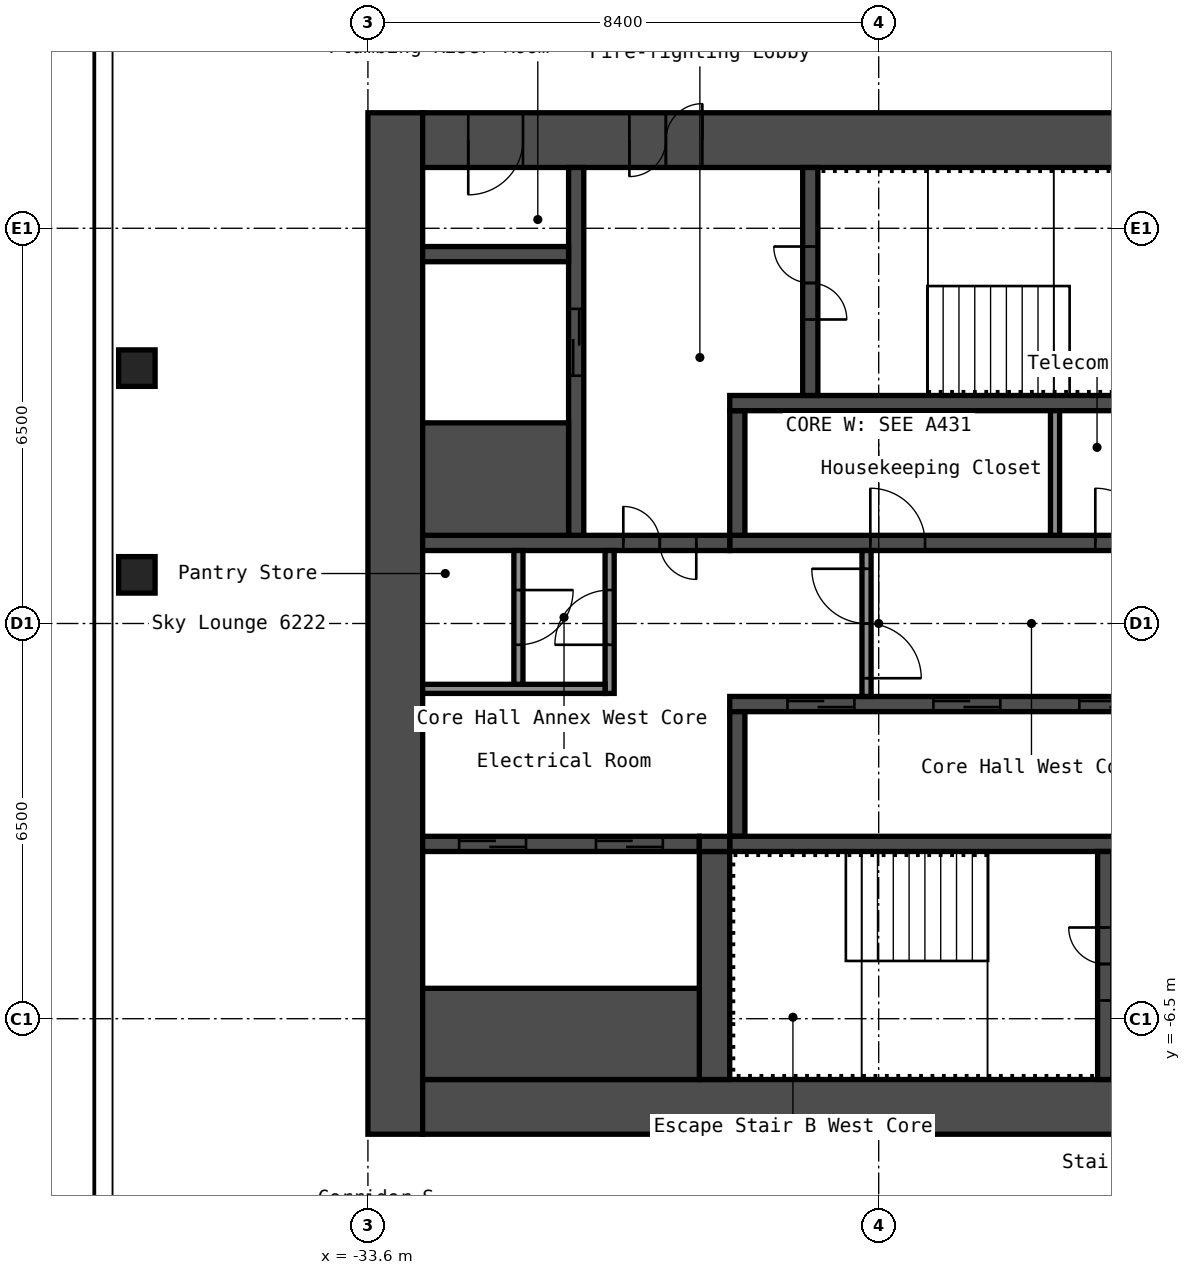
"""IFC4 building model, lengths in metres.
Left out: names, types, materials, properties, quantities, classifications, styles, units other than length and angle.
Written with IfcOpenShell. Run it as: python <this file> out.ifc"""

import sys

from ifc_helpers import new_model, si_unit, direction, frame, frame_2d, origin, origin_2d, place, context, subcontext, project, spatial, rectangle, hollow_rectangle, extrude, element, fill, save


model = new_model("IFC4")
c1 = context("Model", 3, precision=1e-05, world=origin(), true_north=direction((0.0, 1.0)))
c2 = subcontext(c1, "Body", "Model", "MODEL_VIEW")
j1 = project(units=[si_unit("LENGTHUNIT", "METRE"), si_unit("PLANEANGLEUNIT", "RADIAN")], contexts=[c1])
p1 = place(None, origin())
s1 = spatial("IfcSite", under=j1, at=p1, CompositionType="ELEMENT")
p2 = place(p1, origin())
s2 = spatial("IfcBuilding", under=s1, at=p2, CompositionType="ELEMENT")
p3 = place(p2, frame((0.0, 0.0, 218.6)))
s3 = spatial("IfcBuildingStorey", under=s2, at=p3, CompositionType="ELEMENT", Elevation=218.6)
for number, where, z_axis, x_axis in (
    (1, (-37.4, 0.8, 0.0), (0.0, 0.0, 1.0), (1.0, 0.0, 0.0)),
    (2, (-37.4, 4.2, 0.0), (0.0, 0.0, 1.0), (1.0, 0.0, 0.0)),
):
    element("IfcColumn", number, at=place(p3, frame(where, z_axis=z_axis, x_axis=x_axis)), inside=s3, PredefinedType="COLUMN", context=c2, shape_type="SweptSolid", body=[
        extrude(hollow_rectangle(XDim=0.6, YDim=0.6, WallThickness=0.025, InnerFilletRadius=0.038, OuterFilletRadius=0.062, at=origin_2d()), origin(), (0.0, 0.0, 1.0), 2.75),
    ])
p4 = place(p3, frame((-33.15, -8.4, 0.0), z_axis=(0.0, 0.0, 1.0), x_axis=(0.0, 1.0, 0.0)))
e3 = element("IfcWall", 3, at=p4, inside=s3, PredefinedType="SHEAR", context=c2, shape_type="SweptSolid", body=[
    extrude(rectangle(XDim=16.8, YDim=0.9, at=frame_2d((8.4, 0.0))), origin(), (0.0, 0.0, 1.0), 2.75),
])
p5 = place(p3, frame((-32.7, 7.95, 0.0), z_axis=(0.0, 0.0, 1.0), x_axis=(1.0, 0.0, 0.0)))
e4 = element("IfcWall", 4, at=p5, inside=s3, PredefinedType="SHEAR", context=c2, shape_type="SweptSolid", body=[
    extrude(rectangle(XDim=15.0, YDim=0.9, at=frame_2d((7.5, 0.0))), origin(), (0.0, 0.0, 1.0), 2.75),
])
p6 = place(p5, frame((3.4, 0.0, 0.0)))
e5 = element("IfcOpeningElement", 5, at=p6, cuts=e4, PredefinedType="OPENING", context=c2, shape_type="SweptSolid", body=[
    extrude(rectangle(XDim=1.2, YDim=2.1, at=frame_2d((0.6, 1.05))), frame((0.0, 0.46, 0.0), z_axis=(0.0, -1.0, 0.0), x_axis=(1.0, 0.0, 0.0)), (0.0, 0.0, 1.0), 0.92),
])
p7 = place(p5, frame((0.75, 0.0, 0.0)))
e6 = element("IfcOpeningElement", 6, at=p7, cuts=e4, PredefinedType="OPENING", context=c2, shape_type="SweptSolid", body=[
    extrude(rectangle(XDim=0.9, YDim=2.1, at=frame_2d((0.45, 1.05))), frame((0.0, 0.46, 0.0), z_axis=(0.0, -1.0, 0.0), x_axis=(1.0, 0.0, 0.0)), (0.0, 0.0, 1.0), 0.92),
])
p8 = place(p3, frame((-32.7, -7.95, 0.0), z_axis=(0.0, 0.0, 1.0), x_axis=(1.0, 0.0, 0.0)))
e7 = element("IfcWall", 7, at=p8, inside=s3, PredefinedType="SHEAR", context=c2, shape_type="SweptSolid", body=[
    extrude(rectangle(XDim=15.0, YDim=0.9, at=frame_2d((7.5, 0.0))), origin(), (0.0, 0.0, 1.0), 2.75),
])
p9 = place(p8, frame((11.45, 0.0, 0.0)))
e8 = element("IfcOpeningElement", 8, at=p9, cuts=e7, PredefinedType="OPENING", context=c2, shape_type="SweptSolid", body=[
    extrude(rectangle(XDim=1.0, YDim=2.1, at=frame_2d((0.5, 1.05))), frame((0.0, 0.46, 0.0), z_axis=(0.0, -1.0, 0.0), x_axis=(1.0, 0.0, 0.0)), (0.0, 0.0, 1.0), 0.92),
])
p10 = place(p3, frame((-27.65, 1.325, 0.0), z_axis=(0.0, 0.0, 1.0), x_axis=(1.0, 0.0, 0.0)))
e9 = element("IfcWall", 9, at=p10, inside=s3, PredefinedType="SHEAR", context=c2, shape_type="SweptSolid", body=[
    extrude(rectangle(XDim=7.5, YDim=0.25, at=frame_2d((3.75, 0.0))), origin(), (0.0, 0.0, 1.0), 2.75),
])
p11 = place(p10, frame((6.012, 0.0, 0.0)))
e10 = element("IfcOpeningElement", 10, at=p11, cuts=e9, PredefinedType="OPENING", context=c2, shape_type="SweptSolid", body=[
    extrude(rectangle(XDim=0.9, YDim=2.1, at=frame_2d((0.45, 1.05))), frame((0.0, 0.135, 0.0), z_axis=(0.0, -1.0, 0.0), x_axis=(1.0, 0.0, 0.0)), (0.0, 0.0, 1.0), 0.27),
])
p12 = place(p10, frame((2.312, 0.0, 0.0)))
e11 = element("IfcOpeningElement", 11, at=p12, cuts=e9, PredefinedType="OPENING", context=c2, shape_type="SweptSolid", body=[
    extrude(rectangle(XDim=0.9, YDim=2.1, at=frame_2d((0.45, 1.05))), frame((0.0, 0.135, 0.0), z_axis=(0.0, -1.0, 0.0), x_axis=(1.0, 0.0, 0.0)), (0.0, 0.0, 1.0), 0.27),
])
p13 = place(p3, frame((-27.525, 1.45, 0.0), z_axis=(0.0, 0.0, 1.0), x_axis=(0.0, 1.0, 0.0)))
e12 = element("IfcWall", 12, at=p13, inside=s3, PredefinedType="SHEAR", context=c2, shape_type="SweptSolid", body=[
    extrude(rectangle(XDim=2.05, YDim=0.25, at=frame_2d((1.025, 0.0))), origin(), (0.0, 0.0, 1.0), 2.75),
])
p14 = place(p3, frame((-27.65, 3.625, 0.0), z_axis=(0.0, 0.0, 1.0), x_axis=(1.0, 0.0, 0.0)))
e13 = element("IfcWall", 13, at=p14, inside=s3, PredefinedType="SHEAR", context=c2, shape_type="SweptSolid", body=[
    extrude(rectangle(XDim=7.5, YDim=0.25, at=frame_2d((3.75, 0.0))), origin(), (0.0, 0.0, 1.0), 2.75),
])
p15 = place(p3, frame((-26.325, 3.75, 0.0), z_axis=(0.0, 0.0, 1.0), x_axis=(0.0, 1.0, 0.0)))
e14 = element("IfcWall", 14, at=p15, inside=s3, PredefinedType="SHEAR", context=c2, shape_type="SweptSolid", body=[
    extrude(rectangle(XDim=3.75, YDim=0.25, at=frame_2d((1.875, 0.0))), origin(), (0.0, 0.0, 1.0), 2.75),
])
p16 = place(p15, frame((1.25, 0.0, 0.0)))
e15 = element("IfcOpeningElement", 15, at=p16, cuts=e14, PredefinedType="OPENING", context=c2, shape_type="SweptSolid", body=[
    extrude(rectangle(XDim=1.2, YDim=2.1, at=frame_2d((0.6, 1.05))), frame((0.0, 0.135, 0.0), z_axis=(0.0, -1.0, 0.0), x_axis=(1.0, 0.0, 0.0)), (0.0, 0.0, 1.0), 0.27),
])
p17 = place(p3, frame((-32.7, 1.325, 0.0), z_axis=(0.0, 0.0, 1.0), x_axis=(1.0, 0.0, 0.0)))
e16 = element("IfcWall", 16, at=p17, inside=s3, PredefinedType="SHEAR", context=c2, shape_type="SweptSolid", body=[
    extrude(rectangle(XDim=5.05, YDim=0.25, at=frame_2d((2.525, 0.0))), origin(), (0.0, 0.0, 1.0), 2.75),
])
p18 = place(p17, frame((3.3, 0.0, 0.0)))
e17 = element("IfcOpeningElement", 17, at=p18, cuts=e16, PredefinedType="OPENING", context=c2, shape_type="SweptSolid", body=[
    extrude(rectangle(XDim=1.2, YDim=2.1, at=frame_2d((0.6, 1.05))), frame((0.0, 0.135, 0.0), z_axis=(0.0, -1.0, 0.0), x_axis=(1.0, 0.0, 0.0)), (0.0, 0.0, 1.0), 0.27),
])
p19 = place(p3, frame((-30.175, 1.45, 0.0), z_axis=(0.0, 0.0, 1.0), x_axis=(0.0, 1.0, 0.0)))
e18 = element("IfcWall", 18, at=p19, inside=s3, PredefinedType="SHEAR", context=c2, shape_type="SweptSolid", body=[
    extrude(rectangle(XDim=6.05, YDim=0.25, at=frame_2d((3.025, 0.0))), origin(), (0.0, 0.0, 1.0), 2.75),
])
p20 = place(p19, frame((2.625, 0.0, 0.0)))
e19 = element("IfcOpeningElement", 19, at=p20, cuts=e18, PredefinedType="OPENING", context=c2, shape_type="SweptSolid", body=[
    extrude(rectangle(XDim=1.1, YDim=2.1, at=frame_2d((0.55, 1.05))), frame((0.0, 0.135, 0.0), z_axis=(0.0, -1.0, 0.0), x_axis=(1.0, 0.0, 0.0)), (0.0, 0.0, 1.0), 0.27),
])
p21 = place(p3, frame((-32.7, 2.375, 0.0), z_axis=(0.0, 0.0, 1.0), x_axis=(1.0, 0.0, 0.0)))
e20 = element("IfcWall", 20, at=p21, inside=s3, PredefinedType="SHEAR", context=c2, shape_type="SweptSolid", body=[
    extrude(rectangle(XDim=2.4, YDim=1.85, at=frame_2d((1.2, 0.0))), origin(), (0.0, 0.0, 1.0), 2.75),
])
p22 = place(p3, frame((-32.7, 6.075, 0.0), z_axis=(0.0, 0.0, 1.0), x_axis=(1.0, 0.0, 0.0)))
e21 = element("IfcWall", 21, at=p22, inside=s3, PredefinedType="SHEAR", context=c2, shape_type="SweptSolid", body=[
    extrude(rectangle(XDim=2.4, YDim=0.25, at=frame_2d((1.2, 0.0))), origin(), (0.0, 0.0, 1.0), 2.75),
])
p23 = place(p3, frame((-27.65, -1.325, 0.0), z_axis=(0.0, 0.0, 1.0), x_axis=(1.0, 0.0, 0.0)))
e22 = element("IfcWall", 22, at=p23, inside=s3, PredefinedType="SHEAR", context=c2, shape_type="SweptSolid", body=[
    extrude(rectangle(XDim=7.5, YDim=0.25, at=frame_2d((3.75, 0.0))), origin(), (0.0, 0.0, 1.0), 2.75),
])
p24 = place(p23, frame((5.75, 0.0, 0.0)))
e23 = element("IfcOpeningElement", 23, at=p24, cuts=e22, PredefinedType="OPENING", context=c2, shape_type="SweptSolid", body=[
    extrude(rectangle(XDim=1.1, YDim=2.1, at=frame_2d((0.55, 1.05))), frame((0.0, 0.135, 0.0), z_axis=(0.0, -1.0, 0.0), x_axis=(1.0, 0.0, 0.0)), (0.0, 0.0, 1.0), 0.27),
])
p25 = place(p23, frame((3.35, 0.0, 0.0)))
e24 = element("IfcOpeningElement", 24, at=p25, cuts=e22, PredefinedType="OPENING", context=c2, shape_type="SweptSolid", body=[
    extrude(rectangle(XDim=1.1, YDim=2.1, at=frame_2d((0.55, 1.05))), frame((0.0, 0.135, 0.0), z_axis=(0.0, -1.0, 0.0), x_axis=(1.0, 0.0, 0.0)), (0.0, 0.0, 1.0), 0.27),
])
p26 = place(p23, frame((0.95, 0.0, 0.0)))
e25 = element("IfcOpeningElement", 25, at=p26, cuts=e22, PredefinedType="OPENING", context=c2, shape_type="SweptSolid", body=[
    extrude(rectangle(XDim=1.1, YDim=2.1, at=frame_2d((0.55, 1.05))), frame((0.0, 0.135, 0.0), z_axis=(0.0, -1.0, 0.0), x_axis=(1.0, 0.0, 0.0)), (0.0, 0.0, 1.0), 0.27),
])
p27 = place(p3, frame((-27.525, -3.5, 0.0), z_axis=(0.0, 0.0, 1.0), x_axis=(0.0, 1.0, 0.0)))
e26 = element("IfcWall", 26, at=p27, inside=s3, PredefinedType="SHEAR", context=c2, shape_type="SweptSolid", body=[
    extrude(rectangle(XDim=2.05, YDim=0.25, at=frame_2d((1.025, 0.0))), origin(), (0.0, 0.0, 1.0), 2.75),
])
p28 = place(p3, frame((-27.65, -3.625, 0.0), z_axis=(0.0, 0.0, 1.0), x_axis=(1.0, 0.0, 0.0)))
e27 = element("IfcWall", 27, at=p28, inside=s3, PredefinedType="SHEAR", context=c2, shape_type="SweptSolid", body=[
    extrude(rectangle(XDim=7.5, YDim=0.25, at=frame_2d((3.75, 0.0))), origin(), (0.0, 0.0, 1.0), 2.75),
])
p29 = place(p3, frame((-21.475, -7.5, 0.0), z_axis=(0.0, 0.0, 1.0), x_axis=(0.0, 1.0, 0.0)))
e28 = element("IfcWall", 28, at=p29, inside=s3, PredefinedType="SHEAR", context=c2, shape_type="SweptSolid", body=[
    extrude(rectangle(XDim=3.75, YDim=0.25, at=frame_2d((1.875, 0.0))), origin(), (0.0, 0.0, 1.0), 2.75),
])
p30 = place(p29, frame((1.3, 0.0, 0.0)))
e29 = element("IfcOpeningElement", 29, at=p30, cuts=e28, PredefinedType="OPENING", context=c2, shape_type="SweptSolid", body=[
    extrude(rectangle(XDim=1.2, YDim=2.1, at=frame_2d((0.6, 1.05))), frame((0.0, 0.135, 0.0), z_axis=(0.0, -1.0, 0.0), x_axis=(1.0, 0.0, 0.0)), (0.0, 0.0, 1.0), 0.27),
])
p31 = place(p3, frame((-27.9, -7.5, 0.0), z_axis=(0.0, 0.0, 1.0), x_axis=(0.0, 1.0, 0.0)))
e30 = element("IfcWall", 30, at=p31, inside=s3, PredefinedType="SHEAR", context=c2, shape_type="SweptSolid", body=[
    extrude(rectangle(XDim=3.75, YDim=0.5, at=frame_2d((1.875, 0.0))), origin(), (0.0, 0.0, 1.0), 2.75),
])
p32 = place(p3, frame((-32.7, -3.625, 0.0), z_axis=(0.0, 0.0, 1.0), x_axis=(1.0, 0.0, 0.0)))
e31 = element("IfcWall", 31, at=p32, inside=s3, PredefinedType="SHEAR", context=c2, shape_type="SweptSolid", body=[
    extrude(rectangle(XDim=4.55, YDim=0.25, at=frame_2d((2.275, 0.0))), origin(), (0.0, 0.0, 1.0), 2.75),
])
p33 = place(p32, frame((2.85, 0.0, 0.0)))
e32 = element("IfcOpeningElement", 32, at=p33, cuts=e31, PredefinedType="OPENING", context=c2, shape_type="SweptSolid", body=[
    extrude(rectangle(XDim=1.1, YDim=2.1, at=frame_2d((0.55, 1.05))), frame((0.0, 0.135, 0.0), z_axis=(0.0, -1.0, 0.0), x_axis=(1.0, 0.0, 0.0)), (0.0, 0.0, 1.0), 0.27),
])
p34 = place(p32, frame((0.6, 0.0, 0.0)))
e33 = element("IfcOpeningElement", 33, at=p34, cuts=e31, PredefinedType="OPENING", context=c2, shape_type="SweptSolid", body=[
    extrude(rectangle(XDim=1.1, YDim=2.1, at=frame_2d((0.55, 1.05))), frame((0.0, 0.135, 0.0), z_axis=(0.0, -1.0, 0.0), x_axis=(1.0, 0.0, 0.0)), (0.0, 0.0, 1.0), 0.27),
])
p35 = place(p3, frame((-32.7, -6.75, 0.0), z_axis=(0.0, 0.0, 1.0), x_axis=(1.0, 0.0, 0.0)))
e34 = element("IfcWall", 34, at=p35, inside=s3, PredefinedType="SHEAR", context=c2, shape_type="SweptSolid", body=[
    extrude(rectangle(XDim=4.55, YDim=1.5, at=frame_2d((2.275, 0.0))), origin(), (0.0, 0.0, 1.0), 2.75),
])
p36 = place(p3, frame((-28.15, -3.625, 0.0), z_axis=(0.0, 0.0, 1.0), x_axis=(1.0, 0.0, 0.0)))
e35 = element("IfcWall", 35, at=p36, inside=s3, PredefinedType="SHEAR", context=c2, shape_type="SweptSolid", body=[
    extrude(rectangle(XDim=0.5, YDim=0.25, at=frame_2d((0.25, 0.0))), origin(), (0.0, 0.0, 1.0), 2.75),
])
p37 = place(p3, frame((-25.4, -1.2, 0.0), z_axis=(0.0, 0.0, 1.0), x_axis=(0.0, 1.0, 0.0)))
e36 = element("IfcWall", 36, at=p37, inside=s3, PredefinedType="PARTITIONING", context=c2, shape_type="SweptSolid", body=[
    extrude(rectangle(XDim=2.4, YDim=0.15, at=frame_2d((1.2, 0.0))), origin(), (0.0, 0.0, 1.0), 2.75),
])
p38 = place(p37, frame((0.3, 0.0, 0.0)))
e37 = element("IfcOpeningElement", 37, at=p38, cuts=e36, PredefinedType="OPENING", context=c2, shape_type="SweptSolid", body=[
    extrude(rectangle(XDim=1.8, YDim=2.1, at=frame_2d((0.9, 1.05))), frame((0.0, 0.085, 0.0), z_axis=(0.0, -1.0, 0.0), x_axis=(1.0, 0.0, 0.0)), (0.0, 0.0, 1.0), 0.17),
])
p39 = place(p3, frame((-29.625, -1.15, 0.0), z_axis=(0.0, 0.0, 1.0), x_axis=(0.0, 1.0, 0.0)))
e38 = element("IfcWall", 38, at=p39, inside=s3, PredefinedType="PARTITIONING", context=c2, shape_type="SweptSolid", body=[
    extrude(rectangle(XDim=2.35, YDim=0.15, at=frame_2d((1.175, 0.0))), origin(), (0.0, 0.0, 1.0), 2.75),
])
p40 = place(p39, frame((0.8, 0.0, 0.0)))
e39 = element("IfcOpeningElement", 39, at=p40, cuts=e38, PredefinedType="OPENING", context=c2, shape_type="SweptSolid", body=[
    extrude(rectangle(XDim=0.9, YDim=2.1, at=frame_2d((0.45, 1.05))), frame((0.0, 0.085, 0.0), z_axis=(0.0, -1.0, 0.0), x_axis=(1.0, 0.0, 0.0)), (0.0, 0.0, 1.0), 0.17),
])
p41 = place(p3, frame((-32.7, -1.075, 0.0), z_axis=(0.0, 0.0, 1.0), x_axis=(1.0, 0.0, 0.0)))
e40 = element("IfcWall", 40, at=p41, inside=s3, PredefinedType="PARTITIONING", context=c2, shape_type="SweptSolid", body=[
    extrude(rectangle(XDim=3.0, YDim=0.15, at=frame_2d((1.5, 0.0))), origin(), (0.0, 0.0, 1.0), 2.75),
])
p42 = place(p3, frame((-31.125, -1.0, 0.0), z_axis=(0.0, 0.0, 1.0), x_axis=(0.0, 1.0, 0.0)))
e41 = element("IfcWall", 41, at=p42, inside=s3, PredefinedType="PARTITIONING", context=c2, shape_type="SweptSolid", body=[
    extrude(rectangle(XDim=2.2, YDim=0.15, at=frame_2d((1.1, 0.0))), origin(), (0.0, 0.0, 1.0), 2.75),
])
p43 = place(p42, frame((0.65, 0.0, 0.0)))
e42 = element("IfcOpeningElement", 42, at=p43, cuts=e41, PredefinedType="OPENING", context=c2, shape_type="SweptSolid", body=[
    extrude(rectangle(XDim=0.9, YDim=2.1, at=frame_2d((0.45, 1.05))), frame((0.0, 0.085, 0.0), z_axis=(0.0, -1.0, 0.0), x_axis=(1.0, 0.0, 0.0)), (0.0, 0.0, 1.0), 0.17),
])
p44 = place(p3, frame((-22.3, 1.45, 0.0), z_axis=(0.0, 0.0, 1.0), x_axis=(0.0, 1.0, 0.0)))
e43 = element("IfcWall", 43, at=p44, inside=s3, PredefinedType="PARTITIONING", context=c2, shape_type="SweptSolid", body=[
    extrude(rectangle(XDim=2.05, YDim=0.15, at=frame_2d((1.025, 0.0))), origin(), (0.0, 0.0, 1.0), 2.75),
])
p45 = place(p6, origin())
e44 = element("IfcDoor", 44, at=p45, inside=s3, OperationType="DOUBLE_DOOR_SINGLE_SWING", PredefinedType="DOOR", context=c2, shape_type="SweptSolid", body=[
    extrude(rectangle(XDim=1.2, YDim=2.1, at=frame_2d((0.6, 1.05))), frame((0.0, 0.025, 0.0), z_axis=(0.0, -1.0, 0.0), x_axis=(1.0, 0.0, 0.0)), (0.0, 0.0, 1.0), 0.05),
])
fill(e5, e44)
p46 = place(p7, origin())
e45 = element("IfcDoor", 45, at=p46, inside=s3, OperationType="SINGLE_SWING_LEFT", PredefinedType="DOOR", context=c2, shape_type="SweptSolid", body=[
    extrude(rectangle(XDim=0.9, YDim=2.1, at=frame_2d((0.45, 1.05))), frame((0.0, 0.025, 0.0), z_axis=(0.0, -1.0, 0.0), x_axis=(1.0, 0.0, 0.0)), (0.0, 0.0, 1.0), 0.05),
])
fill(e6, e45)
p47 = place(p16, origin())
e46 = element("IfcDoor", 46, at=p47, inside=s3, OperationType="DOUBLE_DOOR_SINGLE_SWING", PredefinedType="DOOR", context=c2, shape_type="SweptSolid", body=[
    extrude(rectangle(XDim=1.2, YDim=2.1, at=frame_2d((0.6, 1.05))), frame((0.0, 0.025, 0.0), z_axis=(0.0, -1.0, 0.0), x_axis=(1.0, 0.0, 0.0)), (0.0, 0.0, 1.0), 0.05),
])
fill(e15, e46)
p48 = place(p30, origin())
e47 = element("IfcDoor", 47, at=p48, inside=s3, OperationType="DOUBLE_DOOR_SINGLE_SWING", PredefinedType="DOOR", context=c2, shape_type="SweptSolid", body=[
    extrude(rectangle(XDim=1.2, YDim=2.1, at=frame_2d((0.6, 1.05))), frame((0.0, 0.025, 0.0), z_axis=(0.0, -1.0, 0.0), x_axis=(1.0, 0.0, 0.0)), (0.0, 0.0, 1.0), 0.05),
])
fill(e29, e47)
p49 = place(p18, origin())
e48 = element("IfcDoor", 48, at=p49, inside=s3, OperationType="DOUBLE_DOOR_SINGLE_SWING", PredefinedType="DOOR", context=c2, shape_type="SweptSolid", body=[
    extrude(rectangle(XDim=1.2, YDim=2.1, at=frame_2d((0.6, 1.05))), frame((0.0, 0.025, 0.0), z_axis=(0.0, -1.0, 0.0), x_axis=(1.0, 0.0, 0.0)), (0.0, 0.0, 1.0), 0.05),
])
fill(e17, e48)
p50 = place(p38, origin())
e49 = element("IfcDoor", 49, at=p50, inside=s3, OperationType="DOUBLE_DOOR_SINGLE_SWING", PredefinedType="DOOR", context=c2, shape_type="SweptSolid", body=[
    extrude(rectangle(XDim=1.8, YDim=2.1, at=frame_2d((0.9, 1.05))), frame((0.0, 0.025, 0.0), z_axis=(0.0, -1.0, 0.0), x_axis=(1.0, 0.0, 0.0)), (0.0, 0.0, 1.0), 0.05),
])
fill(e37, e49)
p51 = place(p40, origin())
e50 = element("IfcDoor", 50, at=p51, inside=s3, OperationType="SINGLE_SWING_RIGHT", PredefinedType="DOOR", context=c2, shape_type="SweptSolid", body=[
    extrude(rectangle(XDim=0.9, YDim=2.1, at=frame_2d((0.45, 1.05))), frame((0.0, 0.025, 0.0), z_axis=(0.0, -1.0, 0.0), x_axis=(1.0, 0.0, 0.0)), (0.0, 0.0, 1.0), 0.05),
])
fill(e39, e50)
p52 = place(p43, origin())
e51 = element("IfcDoor", 51, at=p52, inside=s3, OperationType="SINGLE_SWING_RIGHT", PredefinedType="DOOR", context=c2, shape_type="SweptSolid", body=[
    extrude(rectangle(XDim=0.9, YDim=2.1, at=frame_2d((0.45, 1.05))), frame((0.0, 0.025, 0.0), z_axis=(0.0, -1.0, 0.0), x_axis=(1.0, 0.0, 0.0)), (0.0, 0.0, 1.0), 0.05),
])
fill(e42, e51)
p53 = place(p11, origin())
e52 = element("IfcDoor", 52, at=p53, inside=s3, OperationType="SINGLE_SWING_RIGHT", PredefinedType="DOOR", context=c2, shape_type="SweptSolid", body=[
    extrude(rectangle(XDim=0.9, YDim=2.1, at=frame_2d((0.45, 1.05))), frame((0.0, 0.025, 0.0), z_axis=(0.0, -1.0, 0.0), x_axis=(1.0, 0.0, 0.0)), (0.0, 0.0, 1.0), 0.05),
])
fill(e10, e52)
p54 = place(p12, origin())
e53 = element("IfcDoor", 53, at=p54, inside=s3, OperationType="SINGLE_SWING_RIGHT", PredefinedType="DOOR", context=c2, shape_type="SweptSolid", body=[
    extrude(rectangle(XDim=0.9, YDim=2.1, at=frame_2d((0.45, 1.05))), frame((0.0, 0.025, 0.0), z_axis=(0.0, -1.0, 0.0), x_axis=(1.0, 0.0, 0.0)), (0.0, 0.0, 1.0), 0.05),
])
fill(e11, e53)
p55 = place(p24, origin())
e54 = element("IfcDoor", 54, at=p55, inside=s3, OperationType="DOUBLE_DOOR_SLIDING", PredefinedType="DOOR", context=c2, shape_type="SweptSolid", body=[
    extrude(rectangle(XDim=1.1, YDim=2.1, at=frame_2d((0.55, 1.05))), frame((0.0, 0.025, 0.0), z_axis=(0.0, -1.0, 0.0), x_axis=(1.0, 0.0, 0.0)), (0.0, 0.0, 1.0), 0.05),
])
fill(e23, e54)
p56 = place(p25, origin())
e55 = element("IfcDoor", 55, at=p56, inside=s3, OperationType="DOUBLE_DOOR_SLIDING", PredefinedType="DOOR", context=c2, shape_type="SweptSolid", body=[
    extrude(rectangle(XDim=1.1, YDim=2.1, at=frame_2d((0.55, 1.05))), frame((0.0, 0.025, 0.0), z_axis=(0.0, -1.0, 0.0), x_axis=(1.0, 0.0, 0.0)), (0.0, 0.0, 1.0), 0.05),
])
fill(e24, e55)
p57 = place(p26, origin())
e56 = element("IfcDoor", 56, at=p57, inside=s3, OperationType="DOUBLE_DOOR_SLIDING", PredefinedType="DOOR", context=c2, shape_type="SweptSolid", body=[
    extrude(rectangle(XDim=1.1, YDim=2.1, at=frame_2d((0.55, 1.05))), frame((0.0, 0.025, 0.0), z_axis=(0.0, -1.0, 0.0), x_axis=(1.0, 0.0, 0.0)), (0.0, 0.0, 1.0), 0.05),
])
fill(e25, e56)
p58 = place(p20, origin())
e57 = element("IfcDoor", 57, at=p58, inside=s3, OperationType="DOUBLE_DOOR_SLIDING", PredefinedType="DOOR", context=c2, shape_type="SweptSolid", body=[
    extrude(rectangle(XDim=1.1, YDim=2.1, at=frame_2d((0.55, 1.05))), frame((0.0, 0.025, 0.0), z_axis=(0.0, -1.0, 0.0), x_axis=(1.0, 0.0, 0.0)), (0.0, 0.0, 1.0), 0.05),
])
fill(e19, e57)
p59 = place(p33, origin())
e58 = element("IfcDoor", 58, at=p59, inside=s3, OperationType="DOUBLE_DOOR_SLIDING", PredefinedType="DOOR", context=c2, shape_type="SweptSolid", body=[
    extrude(rectangle(XDim=1.1, YDim=2.1, at=frame_2d((0.55, 1.05))), frame((0.0, 0.025, 0.0), z_axis=(0.0, -1.0, 0.0), x_axis=(1.0, 0.0, 0.0)), (0.0, 0.0, 1.0), 0.05),
])
fill(e32, e58)
p60 = place(p34, origin())
e59 = element("IfcDoor", 59, at=p60, inside=s3, OperationType="DOUBLE_DOOR_SLIDING", PredefinedType="DOOR", context=c2, shape_type="SweptSolid", body=[
    extrude(rectangle(XDim=1.1, YDim=2.1, at=frame_2d((0.55, 1.05))), frame((0.0, 0.025, 0.0), z_axis=(0.0, -1.0, 0.0), x_axis=(1.0, 0.0, 0.0)), (0.0, 0.0, 1.0), 0.05),
])
fill(e33, e59)
save(model, sys.argv[1])
